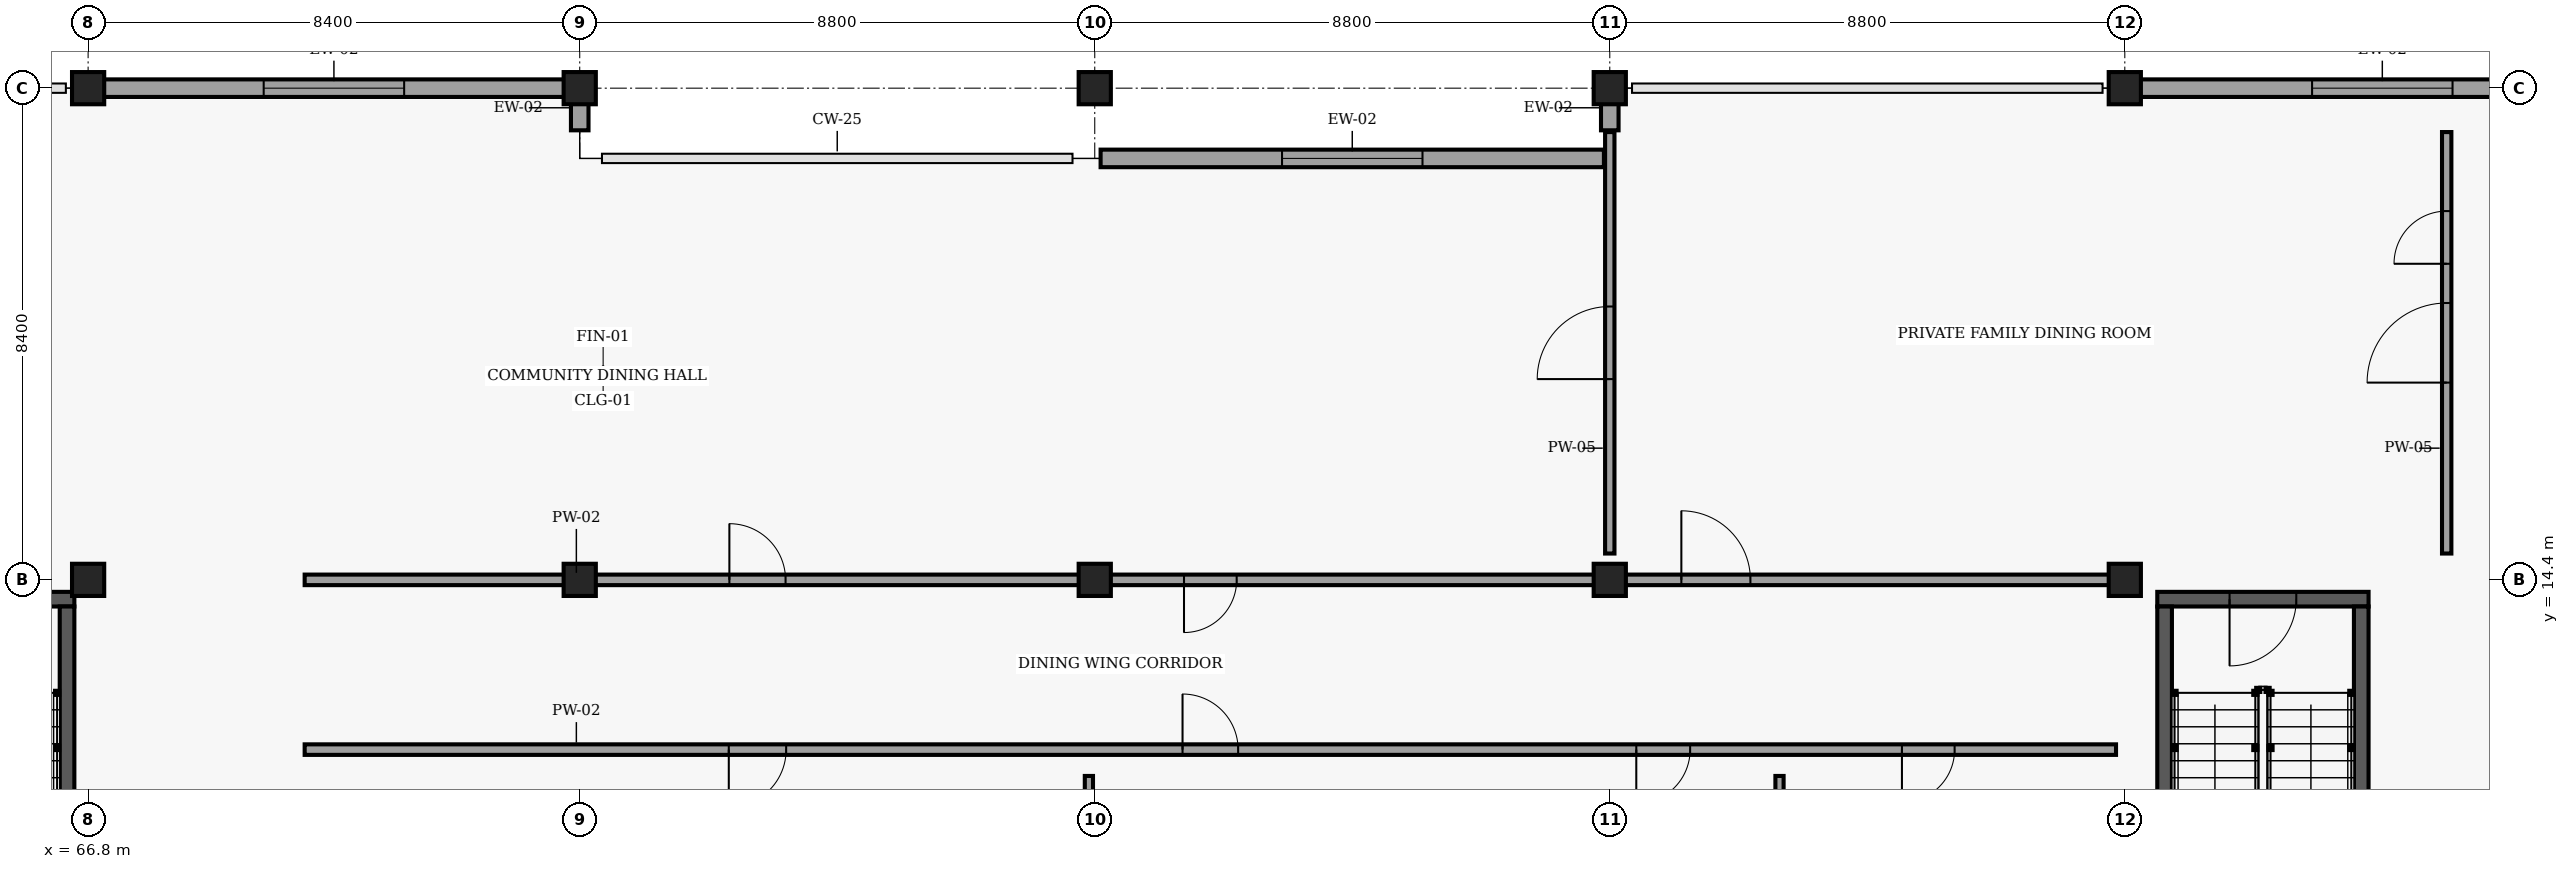
"""IFC4 building model, lengths in metres.
Left out: names, types, materials, properties, quantities, classifications, styles, units other than length and angle.
Written with IfcOpenShell. Run it as: python <this file> out.ifc"""

import sys

from ifc_helpers import new_model, si_unit, direction, frame, frame_2d, origin, origin_2d, place, context, subcontext, project, spatial, rectangle, extrude, element, fill, save


model = new_model("IFC4")
c1 = context("Model", 3, precision=1e-05, world=origin(), true_north=direction((0.0, 1.0)))
c2 = subcontext(c1, "Body", "Model", "MODEL_VIEW")
j1 = project(units=[si_unit("LENGTHUNIT", "METRE"), si_unit("PLANEANGLEUNIT", "RADIAN")], contexts=[c1])
p1 = place(None, origin())
s1 = spatial("IfcSite", under=j1, at=p1, CompositionType="ELEMENT")
p2 = place(p1, origin())
s2 = spatial("IfcBuilding", under=s1, at=p2, CompositionType="ELEMENT")
p3 = place(p2, origin())
s3 = spatial("IfcBuildingStorey", under=s2, at=p3, CompositionType="ELEMENT", Elevation=0.0)
for number, where, z_axis, x_axis in (
    (1, (66.8, 14.4, 0.0), (0.0, 0.0, 1.0), (1.0, 0.0, 0.0)),
    (2, (66.8, 22.8, 0.0), (0.0, 0.0, 1.0), (1.0, 0.0, 0.0)),
    (3, (75.2, 14.4, 0.0), (0.0, 0.0, 1.0), (1.0, 0.0, 0.0)),
    (4, (75.2, 22.8, 0.0), (0.0, 0.0, 1.0), (1.0, 0.0, 0.0)),
    (5, (84.0, 14.4, 0.0), (0.0, 0.0, 1.0), (1.0, 0.0, 0.0)),
    (6, (84.0, 22.8, 0.0), (0.0, 0.0, 1.0), (1.0, 0.0, 0.0)),
    (7, (92.8, 14.4, 0.0), (0.0, 0.0, 1.0), (1.0, 0.0, 0.0)),
    (8, (92.8, 22.8, 0.0), (0.0, 0.0, 1.0), (1.0, 0.0, 0.0)),
    (9, (101.6, 14.4, 0.0), (0.0, 0.0, 1.0), (1.0, 0.0, 0.0)),
    (10, (101.6, 22.8, 0.0), (0.0, 0.0, 1.0), (1.0, 0.0, 0.0)),
):
    element("IfcColumn", number, at=place(p3, frame(where, z_axis=z_axis, x_axis=x_axis)), inside=s3, PredefinedType="COLUMN", context=c2, shape_type="SweptSolid", body=[
        extrude(rectangle(XDim=0.55, YDim=0.55, at=origin_2d()), origin(), (0.0, 0.0, 1.0), 4.8),
    ])
p4 = place(p3, frame((66.9, 22.8, 0.0), z_axis=(0.0, 0.0, 1.0), x_axis=(1.0, 0.0, 0.0)))
e11 = element("IfcWall", 11, at=p4, inside=s3, PredefinedType="SOLIDWALL", context=c2, shape_type="SweptSolid", body=[
    extrude(rectangle(XDim=8.2, YDim=0.3, at=frame_2d((4.1, 0.0))), origin(), (0.0, 0.0, 1.0), 4.065),
])
p5 = place(p4, frame((2.9, 0.0, 0.9)))
e12 = element("IfcOpeningElement", 12, at=p5, cuts=e11, PredefinedType="OPENING", context=c2, shape_type="SweptSolid", body=[
    extrude(rectangle(XDim=2.4, YDim=2.1, at=frame_2d((1.2, 1.05))), frame((0.0, 0.16, 0.0), z_axis=(0.0, -1.0, 0.0), x_axis=(1.0, 0.0, 0.0)), (0.0, 0.0, 1.0), 0.32),
])
p6 = place(p3, frame((84.1, 21.6, 0.0), z_axis=(0.0, 0.0, 1.0), x_axis=(1.0, 0.0, 0.0)))
e13 = element("IfcWall", 13, at=p6, inside=s3, PredefinedType="SOLIDWALL", context=c2, shape_type="SweptSolid", body=[
    extrude(rectangle(XDim=8.6, YDim=0.3, at=frame_2d((4.3, 0.0))), origin(), (0.0, 0.0, 1.0), 4.35),
])
p7 = place(p6, frame((3.1, 0.0, 0.9)))
e14 = element("IfcOpeningElement", 14, at=p7, cuts=e13, PredefinedType="OPENING", context=c2, shape_type="SweptSolid", body=[
    extrude(rectangle(XDim=2.4, YDim=2.1, at=frame_2d((1.2, 1.05))), frame((0.0, 0.16, 0.0), z_axis=(0.0, -1.0, 0.0), x_axis=(1.0, 0.0, 0.0)), (0.0, 0.0, 1.0), 0.32),
])
p8 = place(p3, frame((101.7, 22.8, 0.0), z_axis=(0.0, 0.0, 1.0), x_axis=(1.0, 0.0, 0.0)))
e15 = element("IfcWall", 15, at=p8, inside=s3, PredefinedType="SOLIDWALL", context=c2, shape_type="SweptSolid", body=[
    extrude(rectangle(XDim=8.6, YDim=0.3, at=frame_2d((4.3, 0.0))), origin(), (0.0, 0.0, 1.0), 4.065),
])
p9 = place(p8, frame((3.1, 0.0, 0.9)))
e16 = element("IfcOpeningElement", 16, at=p9, cuts=e15, PredefinedType="OPENING", context=c2, shape_type="SweptSolid", body=[
    extrude(rectangle(XDim=2.4, YDim=2.1, at=frame_2d((1.2, 1.05))), frame((0.0, 0.16, 0.0), z_axis=(0.0, -1.0, 0.0), x_axis=(1.0, 0.0, 0.0)), (0.0, 0.0, 1.0), 0.32),
])
for number, where, z_axis, x_axis in (
    (17, (75.2, 22.08, 0.0), (0.0, 0.0, 1.0), (0.0, 1.0, 0.0)),
    (18, (92.8, 22.08, 0.0), (0.0, 0.0, 1.0), (0.0, 1.0, 0.0)),
):
    element("IfcWall", number, at=place(p3, frame(where, z_axis=z_axis, x_axis=x_axis)), inside=s3, PredefinedType="SOLIDWALL", context=c2, shape_type="SweptSolid", body=[
        extrude(rectangle(XDim=0.77, YDim=0.3, at=frame_2d((0.385, 0.0))), origin(), (0.0, 0.0, 1.0), 3.845),
    ])
p10 = place(p3, frame((62.955, 14.07, 0.0), z_axis=(0.0, 0.0, 1.0), x_axis=(1.0, 0.0, 0.0)))
e19 = element("IfcWall", 19, at=p10, inside=s3, PredefinedType="SHEAR", context=c2, shape_type="SweptSolid", body=[
    extrude(rectangle(XDim=3.61, YDim=0.25, at=frame_2d((1.805, 0.0))), origin(), (0.0, 0.0, 1.0), 4.56),
])
p11 = place(p10, frame((1.205, 0.0, 0.0)))
e20 = element("IfcOpeningElement", 20, at=p11, cuts=e19, PredefinedType="OPENING", context=c2, shape_type="SweptSolid", body=[
    extrude(rectangle(XDim=1.2, YDim=2.15, at=frame_2d((0.6, 1.075))), frame((0.0, 0.135, 0.0), z_axis=(0.0, -1.0, 0.0), x_axis=(1.0, 0.0, 0.0)), (0.0, 0.0, 1.0), 0.27),
])
p12 = place(p3, frame((66.44, 13.945, 0.0), z_axis=(0.0, 0.0, 1.0), x_axis=(0.0, -1.0, 0.0)))
e21 = element("IfcWall", 21, at=p12, inside=s3, PredefinedType="SHEAR", context=c2, shape_type="SweptSolid", body=[
    extrude(rectangle(XDim=7.39, YDim=0.25, at=frame_2d((3.695, 0.0))), origin(), (0.0, 0.0, 1.0), 4.56),
])
p13 = place(p3, frame((102.155, 14.07, 0.0), z_axis=(0.0, 0.0, 1.0), x_axis=(1.0, 0.0, 0.0)))
e22 = element("IfcWall", 22, at=p13, inside=s3, PredefinedType="SHEAR", context=c2, shape_type="SweptSolid", body=[
    extrude(rectangle(XDim=3.61, YDim=0.25, at=frame_2d((1.805, 0.0))), origin(), (0.0, 0.0, 1.0), 4.56),
])
p14 = place(p13, frame((1.235, 0.0, 0.0)))
e23 = element("IfcOpeningElement", 23, at=p14, cuts=e22, PredefinedType="OPENING", context=c2, shape_type="SweptSolid", body=[
    extrude(rectangle(XDim=1.14, YDim=2.15, at=frame_2d((0.57, 1.075))), frame((0.0, 0.135, 0.0), z_axis=(0.0, -1.0, 0.0), x_axis=(1.0, 0.0, 0.0)), (0.0, 0.0, 1.0), 0.27),
])
for number, where, z_axis, x_axis in (
    (24, (105.64, 13.945, 0.0), (0.0, 0.0, 1.0), (0.0, -1.0, 0.0)),
    (25, (102.28, 6.555, 0.0), (0.0, 0.0, 1.0), (0.0, 1.0, 0.0)),
):
    element("IfcWall", number, at=place(p3, frame(where, z_axis=z_axis, x_axis=x_axis)), inside=s3, PredefinedType="SHEAR", context=c2, shape_type="SweptSolid", body=[
        extrude(rectangle(XDim=7.39, YDim=0.25, at=frame_2d((3.695, 0.0))), origin(), (0.0, 0.0, 1.0), 4.56),
    ])
p15 = place(p3, frame((70.5, 11.5, 0.0), z_axis=(0.0, 0.0, 1.0), x_axis=(1.0, 0.0, 0.0)))
e26 = element("IfcWall", 26, at=p15, inside=s3, PredefinedType="PARTITIONING", context=c2, shape_type="SweptSolid", body=[
    extrude(rectangle(XDim=30.95, YDim=0.18, at=frame_2d((15.475, 0.0))), origin(), (0.0, 0.0, 1.0), 3.845),
])
p16 = place(p15, frame((7.247, 0.0, 0.0)))
e27 = element("IfcOpeningElement", 27, at=p16, cuts=e26, PredefinedType="OPENING", context=c2, shape_type="SweptSolid", body=[
    extrude(rectangle(XDim=0.98, YDim=2.12, at=frame_2d((0.49, 1.06))), frame((0.0, 0.1, 0.0), z_axis=(0.0, -1.0, 0.0), x_axis=(1.0, 0.0, 0.0)), (0.0, 0.0, 1.0), 0.2),
])
p17 = place(p15, frame((15.0, 0.0, 0.0)))
e28 = element("IfcOpeningElement", 28, at=p17, cuts=e26, PredefinedType="OPENING", context=c2, shape_type="SweptSolid", body=[
    extrude(rectangle(XDim=0.95, YDim=2.12, at=frame_2d((0.475, 1.06))), frame((0.0, 0.1, 0.0), z_axis=(0.0, -1.0, 0.0), x_axis=(1.0, 0.0, 0.0)), (0.0, 0.0, 1.0), 0.2),
])
p18 = place(p15, frame((22.753, 0.0, 0.0)))
e29 = element("IfcOpeningElement", 29, at=p18, cuts=e26, PredefinedType="OPENING", context=c2, shape_type="SweptSolid", body=[
    extrude(rectangle(XDim=0.92, YDim=2.1, at=frame_2d((0.46, 1.05))), frame((0.0, 0.1, 0.0), z_axis=(0.0, -1.0, 0.0), x_axis=(1.0, 0.0, 0.0)), (0.0, 0.0, 1.0), 0.2),
])
p19 = place(p15, frame((27.292, 0.0, 0.0)))
e30 = element("IfcOpeningElement", 30, at=p19, cuts=e26, PredefinedType="OPENING", context=c2, shape_type="SweptSolid", body=[
    extrude(rectangle(XDim=0.9, YDim=2.06, at=frame_2d((0.45, 1.03))), frame((0.0, 0.1, 0.0), z_axis=(0.0, -1.0, 0.0), x_axis=(1.0, 0.0, 0.0)), (0.0, 0.0, 1.0), 0.2),
])
p20 = place(p3, frame((70.5, 14.4, 0.0), z_axis=(0.0, 0.0, 1.0), x_axis=(1.0, 0.0, 0.0)))
e31 = element("IfcWall", 31, at=p20, inside=s3, PredefinedType="PARTITIONING", context=c2, shape_type="SweptSolid", body=[
    extrude(rectangle(XDim=30.95, YDim=0.18, at=frame_2d((15.475, 0.0))), origin(), (0.0, 0.0, 1.0), 3.795),
])
p21 = place(p20, frame((7.257, 0.0, 0.0)))
e32 = element("IfcOpeningElement", 32, at=p21, cuts=e31, PredefinedType="OPENING", context=c2, shape_type="SweptSolid", body=[
    extrude(rectangle(XDim=0.96, YDim=2.08, at=frame_2d((0.48, 1.04))), frame((0.0, 0.1, 0.0), z_axis=(0.0, -1.0, 0.0), x_axis=(1.0, 0.0, 0.0)), (0.0, 0.0, 1.0), 0.2),
])
p22 = place(p20, frame((15.025, 0.0, 0.0)))
e33 = element("IfcOpeningElement", 33, at=p22, cuts=e31, PredefinedType="OPENING", context=c2, shape_type="SweptSolid", body=[
    extrude(rectangle(XDim=0.9, YDim=2.06, at=frame_2d((0.45, 1.03))), frame((0.0, 0.1, 0.0), z_axis=(0.0, -1.0, 0.0), x_axis=(1.0, 0.0, 0.0)), (0.0, 0.0, 1.0), 0.2),
])
p23 = place(p20, frame((23.523, 0.0, 0.0)))
e34 = element("IfcOpeningElement", 34, at=p23, cuts=e31, PredefinedType="OPENING", context=c2, shape_type="SweptSolid", body=[
    extrude(rectangle(XDim=1.18, YDim=2.18, at=frame_2d((0.59, 1.09))), frame((0.0, 0.1, 0.0), z_axis=(0.0, -1.0, 0.0), x_axis=(1.0, 0.0, 0.0)), (0.0, 0.0, 1.0), 0.2),
])
p24 = place(p3, frame((83.9, 6.55, 0.0), z_axis=(0.0, 0.0, 1.0), x_axis=(0.0, 1.0, 0.0)))
e35 = element("IfcWall", 35, at=p24, inside=s3, PredefinedType="PARTITIONING", context=c2, shape_type="SweptSolid", body=[
    extrude(rectangle(XDim=4.5, YDim=0.14, at=frame_2d((2.25, 0.0))), origin(), (0.0, 0.0, 1.0), 3.845),
])
p25 = place(p24, frame((1.6, 0.0, 0.0)))
e36 = element("IfcOpeningElement", 36, at=p25, cuts=e35, PredefinedType="OPENING", context=c2, shape_type="SweptSolid", body=[
    extrude(rectangle(XDim=1.3, YDim=2.2, at=frame_2d((0.65, 1.1))), frame((0.0, 0.08, 0.0), z_axis=(0.0, -1.0, 0.0), x_axis=(1.0, 0.0, 0.0)), (0.0, 0.0, 1.0), 0.16),
])
p26 = place(p3, frame((95.7, 6.55, 0.0), z_axis=(0.0, 0.0, 1.0), x_axis=(0.0, 1.0, 0.0)))
e37 = element("IfcWall", 37, at=p26, inside=s3, PredefinedType="PARTITIONING", context=c2, shape_type="SweptSolid", body=[
    extrude(rectangle(XDim=4.5, YDim=0.14, at=frame_2d((2.25, 0.0))), origin(), (0.0, 0.0, 1.0), 4.025),
])
p27 = place(p26, frame((1.5, 0.0, 0.0)))
e38 = element("IfcOpeningElement", 38, at=p27, cuts=e37, PredefinedType="OPENING", context=c2, shape_type="SweptSolid", body=[
    extrude(rectangle(XDim=1.5, YDim=2.25, at=frame_2d((0.75, 1.125))), frame((0.0, 0.08, 0.0), z_axis=(0.0, -1.0, 0.0), x_axis=(1.0, 0.0, 0.0)), (0.0, 0.0, 1.0), 0.16),
])
p28 = place(p3, frame((92.8, 14.85, 0.0), z_axis=(0.0, 0.0, 1.0), x_axis=(0.0, 1.0, 0.0)))
e39 = element("IfcWall", 39, at=p28, inside=s3, PredefinedType="PARTITIONING", context=c2, shape_type="SweptSolid", body=[
    extrude(rectangle(XDim=7.2, YDim=0.16, at=frame_2d((3.6, 0.0))), origin(), (0.0, 0.0, 1.0), 3.845),
])
p29 = place(p28, frame((2.98, 0.0, 0.0)))
e40 = element("IfcOpeningElement", 40, at=p29, cuts=e39, PredefinedType="OPENING", context=c2, shape_type="SweptSolid", body=[
    extrude(rectangle(XDim=1.24, YDim=2.2, at=frame_2d((0.62, 1.1))), frame((0.0, 0.09, 0.0), z_axis=(0.0, -1.0, 0.0), x_axis=(1.0, 0.0, 0.0)), (0.0, 0.0, 1.0), 0.18),
])
p30 = place(p3, frame((107.1, 14.85, 0.0), z_axis=(0.0, 0.0, 1.0), x_axis=(0.0, 1.0, 0.0)))
e41 = element("IfcWall", 41, at=p30, inside=s3, PredefinedType="PARTITIONING", context=c2, shape_type="SweptSolid", body=[
    extrude(rectangle(XDim=7.2, YDim=0.16, at=frame_2d((3.6, 0.0))), origin(), (0.0, 0.0, 1.0), 4.545),
])
p31 = place(p30, frame((2.92, 0.0, 0.0)))
e42 = element("IfcOpeningElement", 42, at=p31, cuts=e41, PredefinedType="OPENING", context=c2, shape_type="SweptSolid", body=[
    extrude(rectangle(XDim=1.36, YDim=2.22, at=frame_2d((0.68, 1.11))), frame((0.0, 0.09, 0.0), z_axis=(0.0, -1.0, 0.0), x_axis=(1.0, 0.0, 0.0)), (0.0, 0.0, 1.0), 0.18),
])
p32 = place(p30, frame((4.95, 0.0, 0.0)))
e43 = element("IfcOpeningElement", 43, at=p32, cuts=e41, PredefinedType="OPENING", context=c2, shape_type="SweptSolid", body=[
    extrude(rectangle(XDim=0.9, YDim=2.06, at=frame_2d((0.45, 1.03))), frame((0.0, 0.09, 0.0), z_axis=(0.0, -1.0, 0.0), x_axis=(1.0, 0.0, 0.0)), (0.0, 0.0, 1.0), 0.18),
])
p33 = place(p5, origin())
e44 = element("IfcWindow", 44, at=p33, inside=s3, PartitioningType="SINGLE_PANEL", PredefinedType="WINDOW", context=c2, shape_type="SweptSolid", body=[
    extrude(rectangle(XDim=2.4, YDim=2.1, at=frame_2d((1.2, 1.05))), frame((0.0, 0.03, 0.0), z_axis=(0.0, -1.0, 0.0), x_axis=(1.0, 0.0, 0.0)), (0.0, 0.0, 1.0), 0.06),
])
fill(e12, e44)
p34 = place(p7, origin())
e45 = element("IfcWindow", 45, at=p34, inside=s3, PartitioningType="SINGLE_PANEL", PredefinedType="WINDOW", context=c2, shape_type="SweptSolid", body=[
    extrude(rectangle(XDim=2.4, YDim=2.1, at=frame_2d((1.2, 1.05))), frame((0.0, 0.03, 0.0), z_axis=(0.0, -1.0, 0.0), x_axis=(1.0, 0.0, 0.0)), (0.0, 0.0, 1.0), 0.06),
])
fill(e14, e45)
p35 = place(p9, origin())
e46 = element("IfcWindow", 46, at=p35, inside=s3, PartitioningType="SINGLE_PANEL", PredefinedType="WINDOW", context=c2, shape_type="SweptSolid", body=[
    extrude(rectangle(XDim=2.4, YDim=2.1, at=frame_2d((1.2, 1.05))), frame((0.0, 0.03, 0.0), z_axis=(0.0, -1.0, 0.0), x_axis=(1.0, 0.0, 0.0)), (0.0, 0.0, 1.0), 0.06),
])
fill(e16, e46)
p36 = place(p14, origin())
e47 = element("IfcDoor", 47, at=p36, inside=s3, OperationType="SINGLE_SWING_RIGHT", PredefinedType="DOOR", context=c2, shape_type="SweptSolid", body=[
    extrude(rectangle(XDim=1.14, YDim=2.15, at=frame_2d((0.57, 1.075))), frame((0.0, 0.025, 0.0), z_axis=(0.0, -1.0, 0.0), x_axis=(1.0, 0.0, 0.0)), (0.0, 0.0, 1.0), 0.05),
])
fill(e23, e47)
p37 = place(p16, origin())
e48 = element("IfcDoor", 48, at=p37, inside=s3, OperationType="SINGLE_SWING_RIGHT", PredefinedType="DOOR", context=c2, shape_type="SweptSolid", body=[
    extrude(rectangle(XDim=0.98, YDim=2.12, at=frame_2d((0.49, 1.06))), frame((0.0, 0.025, 0.0), z_axis=(0.0, -1.0, 0.0), x_axis=(1.0, 0.0, 0.0)), (0.0, 0.0, 1.0), 0.05),
])
fill(e27, e48)
p38 = place(p17, origin())
e49 = element("IfcDoor", 49, at=p38, inside=s3, OperationType="SINGLE_SWING_LEFT", PredefinedType="DOOR", context=c2, shape_type="SweptSolid", body=[
    extrude(rectangle(XDim=0.95, YDim=2.12, at=frame_2d((0.475, 1.06))), frame((0.0, 0.025, 0.0), z_axis=(0.0, -1.0, 0.0), x_axis=(1.0, 0.0, 0.0)), (0.0, 0.0, 1.0), 0.05),
])
fill(e28, e49)
p39 = place(p18, origin())
e50 = element("IfcDoor", 50, at=p39, inside=s3, OperationType="SINGLE_SWING_RIGHT", PredefinedType="DOOR", context=c2, shape_type="SweptSolid", body=[
    extrude(rectangle(XDim=0.92, YDim=2.1, at=frame_2d((0.46, 1.05))), frame((0.0, 0.025, 0.0), z_axis=(0.0, -1.0, 0.0), x_axis=(1.0, 0.0, 0.0)), (0.0, 0.0, 1.0), 0.05),
])
fill(e29, e50)
p40 = place(p21, origin())
e51 = element("IfcDoor", 51, at=p40, inside=s3, OperationType="SINGLE_SWING_LEFT", PredefinedType="DOOR", context=c2, shape_type="SweptSolid", body=[
    extrude(rectangle(XDim=0.96, YDim=2.08, at=frame_2d((0.48, 1.04))), frame((0.0, 0.025, 0.0), z_axis=(0.0, -1.0, 0.0), x_axis=(1.0, 0.0, 0.0)), (0.0, 0.0, 1.0), 0.05),
])
fill(e32, e51)
p41 = place(p22, origin())
e52 = element("IfcDoor", 52, at=p41, inside=s3, OperationType="SINGLE_SWING_RIGHT", PredefinedType="DOOR", context=c2, shape_type="SweptSolid", body=[
    extrude(rectangle(XDim=0.9, YDim=2.06, at=frame_2d((0.45, 1.03))), frame((0.0, 0.025, 0.0), z_axis=(0.0, -1.0, 0.0), x_axis=(1.0, 0.0, 0.0)), (0.0, 0.0, 1.0), 0.05),
])
fill(e33, e52)
p42 = place(p23, origin())
e53 = element("IfcDoor", 53, at=p42, inside=s3, OperationType="SINGLE_SWING_LEFT", PredefinedType="DOOR", context=c2, shape_type="SweptSolid", body=[
    extrude(rectangle(XDim=1.18, YDim=2.18, at=frame_2d((0.59, 1.09))), frame((0.0, 0.025, 0.0), z_axis=(0.0, -1.0, 0.0), x_axis=(1.0, 0.0, 0.0)), (0.0, 0.0, 1.0), 0.05),
])
fill(e34, e53)
p43 = place(p29, origin())
e54 = element("IfcDoor", 54, at=p43, inside=s3, OperationType="SINGLE_SWING_LEFT", PredefinedType="DOOR", context=c2, shape_type="SweptSolid", body=[
    extrude(rectangle(XDim=1.24, YDim=2.2, at=frame_2d((0.62, 1.1))), frame((0.0, 0.025, 0.0), z_axis=(0.0, -1.0, 0.0), x_axis=(1.0, 0.0, 0.0)), (0.0, 0.0, 1.0), 0.05),
])
fill(e40, e54)
p44 = place(p31, origin())
e55 = element("IfcDoor", 55, at=p44, inside=s3, OperationType="DOUBLE_DOOR_SINGLE_SWING", PredefinedType="DOOR", context=c2, shape_type="SweptSolid", body=[
    extrude(rectangle(XDim=1.36, YDim=2.22, at=frame_2d((0.68, 1.11))), frame((0.0, 0.025, 0.0), z_axis=(0.0, -1.0, 0.0), x_axis=(1.0, 0.0, 0.0)), (0.0, 0.0, 1.0), 0.05),
])
fill(e42, e55)
p45 = place(p19, origin())
e56 = element("IfcDoor", 56, at=p45, inside=s3, OperationType="SINGLE_SWING_RIGHT", PredefinedType="DOOR", context=c2, shape_type="SweptSolid", body=[
    extrude(rectangle(XDim=0.9, YDim=2.06, at=frame_2d((0.45, 1.03))), frame((0.0, 0.025, 0.0), z_axis=(0.0, -1.0, 0.0), x_axis=(1.0, 0.0, 0.0)), (0.0, 0.0, 1.0), 0.05),
])
fill(e30, e56)
p46 = place(p32, origin())
e57 = element("IfcDoor", 57, at=p46, inside=s3, OperationType="SINGLE_SWING_LEFT", PredefinedType="DOOR", context=c2, shape_type="SweptSolid", body=[
    extrude(rectangle(XDim=0.9, YDim=2.06, at=frame_2d((0.45, 1.03))), frame((0.0, 0.025, 0.0), z_axis=(0.0, -1.0, 0.0), x_axis=(1.0, 0.0, 0.0)), (0.0, 0.0, 1.0), 0.05),
])
fill(e43, e57)
save(model, sys.argv[1])
